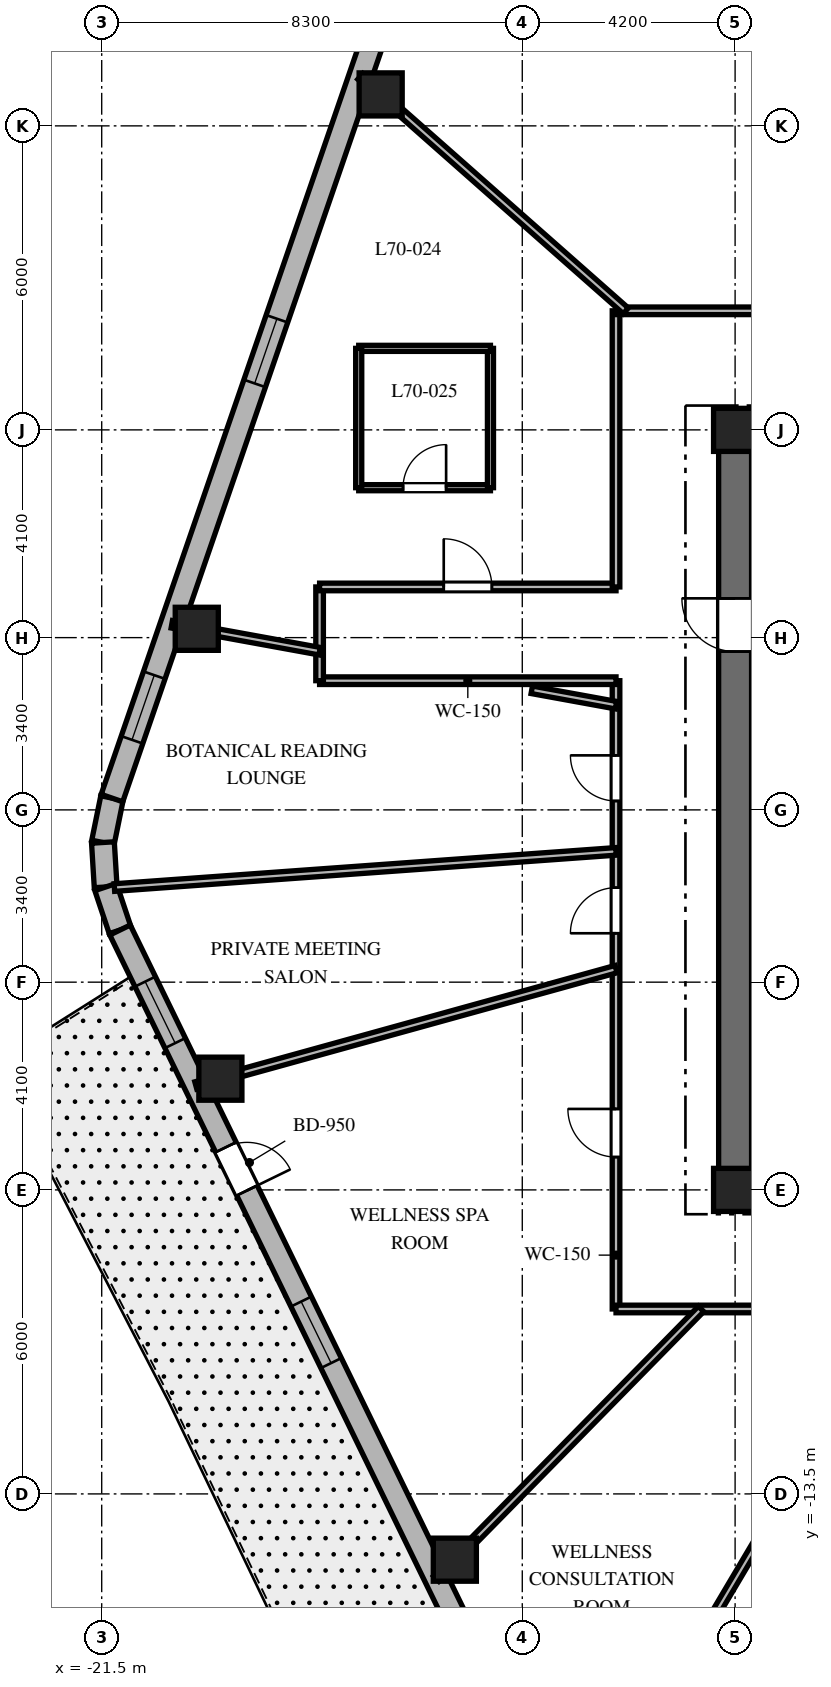
"""IFC4 building model, lengths in metres.
Left out: names, types, materials, properties, quantities, classifications, styles, units other than length and angle.
Written with IfcOpenShell. Run it as: python <this file> out.ifc"""

import sys

from ifc_helpers import new_model, si_unit, direction, frame, frame_2d, origin, origin_2d, place, context, subcontext, project, spatial, rectangle, extrude, element, fill, save


model = new_model("IFC4")
c1 = context("Model", 3, precision=1e-05, world=origin(), true_north=direction((0.0, 1.0)))
c2 = subcontext(c1, "Body", "Model", "MODEL_VIEW")
j1 = project(units=[si_unit("LENGTHUNIT", "METRE"), si_unit("PLANEANGLEUNIT", "RADIAN")], contexts=[c1])
p1 = place(None, origin())
s1 = spatial("IfcSite", under=j1, at=p1, CompositionType="ELEMENT")
p2 = place(p1, origin())
s2 = spatial("IfcBuilding", under=s1, at=p2, CompositionType="ELEMENT")
p3 = place(p2, frame((0.0, 0.0, 280.8)))
s3 = spatial("IfcBuildingStorey", under=s2, at=p3, CompositionType="ELEMENT", Elevation=280.8)
p4 = place(p3, frame((-9.325, -7.5, 0.0), z_axis=(0.0, 0.0, 1.0), x_axis=(1.0, 0.0, 0.0)))
e1 = element("IfcWall", 1, at=p4, inside=s3, PredefinedType="SHEAR", context=c2, shape_type="SweptSolid", body=[
    extrude(rectangle(XDim=18.65, YDim=0.65, at=frame_2d((9.325, 0.0))), origin(), (0.0, 0.0, 1.0), 3.9),
])
p5 = place(p4, frame((9.375, 0.0, 0.0)))
e2 = element("IfcOpeningElement", 2, at=p5, cuts=e1, PredefinedType="OPENING", context=c2, shape_type="SweptSolid", body=[
    extrude(rectangle(XDim=1.0, YDim=2.15, at=frame_2d((0.5, 1.075))), frame((0.0, 0.335, 0.0), z_axis=(0.0, -1.0, 0.0), x_axis=(1.0, 0.0, 0.0)), (0.0, 0.0, 1.0), 0.67),
])
p6 = place(p3, frame((-9.325, 7.5, 0.0), z_axis=(0.0, 0.0, 1.0), x_axis=(1.0, 0.0, 0.0)))
e3 = element("IfcWall", 3, at=p6, inside=s3, PredefinedType="SHEAR", context=c2, shape_type="SweptSolid", body=[
    extrude(rectangle(XDim=9.375, YDim=0.65, at=frame_2d((4.688, 0.0))), origin(), (0.0, 0.0, 1.0), 3.9),
])
p7 = place(p3, frame((-9.0, -7.175, 0.0), z_axis=(0.0, 0.0, 1.0), x_axis=(0.0, 1.0, 0.0)))
e4 = element("IfcWall", 4, at=p7, inside=s3, PredefinedType="SHEAR", context=c2, shape_type="SweptSolid", body=[
    extrude(rectangle(XDim=14.35, YDim=0.65, at=frame_2d((7.175, 0.0))), origin(), (0.0, 0.0, 1.0), 3.9),
])
p8 = place(p7, frame((10.3, 0.0, 0.0)))
e5 = element("IfcOpeningElement", 5, at=p8, cuts=e4, PredefinedType="OPENING", context=c2, shape_type="SweptSolid", body=[
    extrude(rectangle(XDim=1.05, YDim=2.15, at=frame_2d((0.525, 1.075))), frame((0.0, 0.335, 0.0), z_axis=(0.0, -1.0, 0.0), x_axis=(1.0, 0.0, 0.0)), (0.0, 0.0, 1.0), 0.67),
])
for number, where, z_axis, x_axis in (
    (6, (-9.0, -7.5, 0.0), (0.0, 0.0, 1.0), (1.0, 0.0, 0.0)),
    (7, (-9.0, 7.5, 0.0), (0.0, 0.0, 1.0), (1.0, 0.0, 0.0)),
    (8, (-15.995, 14.121, 0.0), (0.0, 0.0, 1.0), (1.0, 0.0, 0.0)),
    (9, (-19.624, 3.574, 0.0), (0.0, 0.0, 1.0), (1.0, 0.0, 0.0)),
    (10, (-19.158, -5.305, 0.0), (0.0, 0.0, 1.0), (1.0, 0.0, 0.0)),
    (11, (-14.531, -14.798, 0.0), (0.0, 0.0, 1.0), (1.0, 0.0, 0.0)),
):
    element("IfcColumn", number, at=place(p3, frame(where, z_axis=z_axis, x_axis=x_axis)), inside=s3, PredefinedType="COLUMN", context=c2, shape_type="SweptSolid", body=[
        extrude(rectangle(XDim=0.85, YDim=0.85, at=origin_2d()), origin(), (0.0, 0.0, 1.0), 3.9),
    ])
p9 = place(p3, frame((-21.298, 0.233, 0.0), z_axis=(0.0, 0.0, 1.0), x_axis=(-0.199158176661, -0.979967356941, 0.0)))
e12 = element("IfcWall", 12, at=p9, inside=s3, PredefinedType="SOLIDWALL", context=c2, shape_type="SweptSolid", body=[
    extrude(rectangle(XDim=0.895, YDim=0.45, at=frame_2d((0.447, 0.0))), origin(), (0.0, 0.0, 1.0), 3.6),
])
p10 = place(p3, frame((-21.476, -0.644, 0.0), z_axis=(0.0, 0.0, 1.0), x_axis=(0.061031097918, -0.998135865044, 0.0)))
e13 = element("IfcWall", 13, at=p10, inside=s3, PredefinedType="SOLIDWALL", context=c2, shape_type="SweptSolid", body=[
    extrude(rectangle(XDim=0.88, YDim=0.45, at=frame_2d((0.44, 0.0))), origin(), (0.0, 0.0, 1.0), 3.6),
])
p11 = place(p3, frame((-21.422, -1.522, 0.0), z_axis=(0.0, 0.0, 1.0), x_axis=(0.316964162323, -0.94843751497, 0.0)))
e14 = element("IfcWall", 14, at=p11, inside=s3, PredefinedType="SOLIDWALL", context=c2, shape_type="SweptSolid", body=[
    extrude(rectangle(XDim=0.895, YDim=0.45, at=frame_2d((0.448, 0.0))), origin(), (0.0, 0.0, 1.0), 3.6),
])
p12 = place(p3, frame((-15.26, 17.776, 0.0), z_axis=(0.0, 0.0, 1.0), x_axis=(-0.325407437101, -0.945573899745, 0.0)))
e15 = element("IfcWall", 15, at=p12, inside=s3, PredefinedType="SOLIDWALL", context=c2, shape_type="SweptSolid", body=[
    extrude(rectangle(XDim=18.552, YDim=0.45, at=frame_2d((9.276, 0.0))), origin(), (0.0, 0.0, 1.0), 3.6),
])
p13 = place(p12, frame((1.161, 0.0, 0.8)))
e16 = element("IfcOpeningElement", 16, at=p13, cuts=e15, PredefinedType="OPENING", context=c2, shape_type="SweptSolid", body=[
    extrude(rectangle(XDim=1.35, YDim=1.75, at=frame_2d((0.675, 0.875))), frame((0.0, 0.235, 0.0), z_axis=(0.0, -1.0, 0.0), x_axis=(1.0, 0.0, 0.0)), (0.0, 0.0, 1.0), 0.47),
])
p14 = place(p12, frame((8.548, 0.0, 0.8)))
e17 = element("IfcOpeningElement", 17, at=p14, cuts=e15, PredefinedType="OPENING", context=c2, shape_type="SweptSolid", body=[
    extrude(rectangle(XDim=1.35, YDim=1.75, at=frame_2d((0.675, 0.875))), frame((0.0, 0.235, 0.0), z_axis=(0.0, -1.0, 0.0), x_axis=(1.0, 0.0, 0.0)), (0.0, 0.0, 1.0), 0.47),
])
p15 = place(p12, frame((15.987, 0.0, 0.8)))
e18 = element("IfcOpeningElement", 18, at=p15, cuts=e15, PredefinedType="OPENING", context=c2, shape_type="SweptSolid", body=[
    extrude(rectangle(XDim=1.35, YDim=1.75, at=frame_2d((0.675, 0.875))), frame((0.0, 0.235, 0.0), z_axis=(0.0, -1.0, 0.0), x_axis=(1.0, 0.0, 0.0)), (0.0, 0.0, 1.0), 0.47),
])
p16 = place(p3, frame((-21.138, -2.371, 0.0), z_axis=(0.0, 0.0, 1.0), x_axis=(0.438128124058, -0.89891253574, 0.0)))
e19 = element("IfcWall", 19, at=p16, inside=s3, PredefinedType="SOLIDWALL", context=c2, shape_type="SweptSolid", body=[
    extrude(rectangle(XDim=17.565, YDim=0.45, at=frame_2d((8.782, 0.0))), origin(), (0.0, 0.0, 1.0), 3.6),
])
p17 = place(p16, frame((4.769, 0.0, 0.0)))
e20 = element("IfcOpeningElement", 20, at=p17, cuts=e19, PredefinedType="OPENING", context=c2, shape_type="SweptSolid", body=[
    extrude(rectangle(XDim=0.95, YDim=2.15, at=frame_2d((0.475, 1.075))), frame((0.0, 0.235, 0.0), z_axis=(0.0, -1.0, 0.0), x_axis=(1.0, 0.0, 0.0)), (0.0, 0.0, 1.0), 0.47),
])
p18 = place(p16, frame((1.133, 0.0, 0.8)))
e21 = element("IfcOpeningElement", 21, at=p18, cuts=e19, PredefinedType="OPENING", context=c2, shape_type="SweptSolid", body=[
    extrude(rectangle(XDim=1.35, YDim=1.75, at=frame_2d((0.675, 0.875))), frame((0.0, 0.235, 0.0), z_axis=(0.0, -1.0, 0.0), x_axis=(1.0, 0.0, 0.0)), (0.0, 0.0, 1.0), 0.47),
])
p19 = place(p16, frame((8.158, 0.0, 0.8)))
e22 = element("IfcOpeningElement", 22, at=p19, cuts=e19, PredefinedType="OPENING", context=c2, shape_type="SweptSolid", body=[
    extrude(rectangle(XDim=1.35, YDim=1.75, at=frame_2d((0.675, 0.875))), frame((0.0, 0.235, 0.0), z_axis=(0.0, -1.0, 0.0), x_axis=(1.0, 0.0, 0.0)), (0.0, 0.0, 1.0), 0.47),
])
p20 = place(p16, frame((15.132, 0.0, 0.8)))
e23 = element("IfcOpeningElement", 23, at=p20, cuts=e19, PredefinedType="OPENING", context=c2, shape_type="SweptSolid", body=[
    extrude(rectangle(XDim=1.35, YDim=1.75, at=frame_2d((0.675, 0.875))), frame((0.0, 0.235, 0.0), z_axis=(0.0, -1.0, 0.0), x_axis=(1.0, 0.0, 0.0)), (0.0, 0.0, 1.0), 0.47),
])
p21 = place(p3, frame((-11.35, -9.85, 0.0), z_axis=(0.0, 0.0, 1.0), x_axis=(0.0, 1.0, 0.0)))
e24 = element("IfcWall", 24, at=p21, inside=s3, PredefinedType="PARTITIONING", context=c2, shape_type="SweptSolid", body=[
    extrude(rectangle(XDim=12.4, YDim=0.15, at=frame_2d((6.2, 0.0))), origin(), (0.0, 0.0, 1.0), 3.09),
])
p22 = place(p21, frame((10.026, 0.0, 0.0)))
e25 = element("IfcOpeningElement", 25, at=p22, cuts=e24, PredefinedType="OPENING", context=c2, shape_type="SweptSolid", body=[
    extrude(rectangle(XDim=0.9, YDim=2.03, at=frame_2d((0.45, 1.015))), frame((0.0, 0.085, 0.0), z_axis=(0.0, -1.0, 0.0), x_axis=(1.0, 0.0, 0.0)), (0.0, 0.0, 1.0), 0.17),
])
p23 = place(p21, frame((7.415, 0.0, 0.0)))
e26 = element("IfcOpeningElement", 26, at=p23, cuts=e24, PredefinedType="OPENING", context=c2, shape_type="SweptSolid", body=[
    extrude(rectangle(XDim=0.9, YDim=2.03, at=frame_2d((0.45, 1.015))), frame((0.0, 0.085, 0.0), z_axis=(0.0, -1.0, 0.0), x_axis=(1.0, 0.0, 0.0)), (0.0, 0.0, 1.0), 0.17),
])
p24 = place(p21, frame((2.998, 0.0, 0.0)))
e27 = element("IfcOpeningElement", 27, at=p24, cuts=e24, PredefinedType="OPENING", context=c2, shape_type="SweptSolid", body=[
    extrude(rectangle(XDim=0.95, YDim=2.03, at=frame_2d((0.475, 1.015))), frame((0.0, 0.085, 0.0), z_axis=(0.0, -1.0, 0.0), x_axis=(1.0, 0.0, 0.0)), (0.0, 0.0, 1.0), 0.17),
])
p25 = place(p3, frame((-11.35, 2.55, 0.0), z_axis=(0.0, 0.0, 1.0), x_axis=(-1.0, 0.0, 0.0)))
e28 = element("IfcWall", 28, at=p25, inside=s3, PredefinedType="PARTITIONING", context=c2, shape_type="SweptSolid", body=[
    extrude(rectangle(XDim=5.85, YDim=0.15, at=frame_2d((2.925, 0.0))), origin(), (0.0, 0.0, 1.0), 3.041),
])
p26 = place(p3, frame((-17.2, 2.55, 0.0), z_axis=(0.0, 0.0, 1.0), x_axis=(0.0, 1.0, 0.0)))
e29 = element("IfcWall", 29, at=p26, inside=s3, PredefinedType="PARTITIONING", context=c2, shape_type="SweptSolid", body=[
    extrude(rectangle(XDim=1.85, YDim=0.15, at=frame_2d((0.925, 0.0))), origin(), (0.0, 0.0, 1.0), 3.09),
])
p27 = place(p3, frame((-17.2, 4.4, 0.0), z_axis=(0.0, 0.0, 1.0), x_axis=(1.0, 0.0, 0.0)))
e30 = element("IfcWall", 30, at=p27, inside=s3, PredefinedType="PARTITIONING", context=c2, shape_type="SweptSolid", body=[
    extrude(rectangle(XDim=5.85, YDim=0.15, at=frame_2d((2.925, 0.0))), origin(), (0.0, 0.0, 1.0), 3.041),
])
p28 = place(p27, frame((2.45, 0.0, 0.0)))
e31 = element("IfcOpeningElement", 31, at=p28, cuts=e30, PredefinedType="OPENING", context=c2, shape_type="SweptSolid", body=[
    extrude(rectangle(XDim=0.95, YDim=2.03, at=frame_2d((0.475, 1.015))), frame((0.0, 0.085, 0.0), z_axis=(0.0, -1.0, 0.0), x_axis=(1.0, 0.0, 0.0)), (0.0, 0.0, 1.0), 0.17),
])
p29 = place(p3, frame((-11.35, 4.4, 0.0), z_axis=(0.0, 0.0, 1.0), x_axis=(0.0, 1.0, 0.0)))
e32 = element("IfcWall", 32, at=p29, inside=s3, PredefinedType="PARTITIONING", context=c2, shape_type="SweptSolid", body=[
    extrude(rectangle(XDim=5.45, YDim=0.15, at=frame_2d((2.725, 0.0))), origin(), (0.0, 0.0, 1.0), 3.09),
])
p30 = place(p3, frame((-11.35, 9.85, 0.0), z_axis=(0.0, 0.0, 1.0), x_axis=(1.0, 0.0, 0.0)))
e33 = element("IfcWall", 33, at=p30, inside=s3, PredefinedType="PARTITIONING", context=c2, shape_type="SweptSolid", body=[
    extrude(rectangle(XDim=10.43, YDim=0.15, at=frame_2d((5.215, 0.0))), origin(), (0.0, 0.0, 1.0), 3.09),
])
p31 = place(p30, frame((8.382, 0.0, 0.0)))
e34 = element("IfcOpeningElement", 34, at=p31, cuts=e33, PredefinedType="OPENING", context=c2, shape_type="SweptSolid", body=[
    extrude(rectangle(XDim=0.95, YDim=2.03, at=frame_2d((0.475, 1.015))), frame((0.0, 0.085, 0.0), z_axis=(0.0, -1.0, 0.0), x_axis=(1.0, 0.0, 0.0)), (0.0, 0.0, 1.0), 0.17),
])
p32 = place(p30, frame((3.416, 0.0, 0.0)))
e35 = element("IfcOpeningElement", 35, at=p32, cuts=e33, PredefinedType="OPENING", context=c2, shape_type="SweptSolid", body=[
    extrude(rectangle(XDim=0.95, YDim=2.03, at=frame_2d((0.475, 1.015))), frame((0.0, 0.085, 0.0), z_axis=(0.0, -1.0, 0.0), x_axis=(1.0, 0.0, 0.0)), (0.0, 0.0, 1.0), 0.17),
])
p33 = place(p3, frame((-0.92, -9.85, 0.0), z_axis=(0.0, 0.0, 1.0), x_axis=(-1.0, 0.0, 0.0)))
e36 = element("IfcWall", 36, at=p33, inside=s3, PredefinedType="PARTITIONING", context=c2, shape_type="SweptSolid", body=[
    extrude(rectangle(XDim=10.43, YDim=0.15, at=frame_2d((5.215, 0.0))), origin(), (0.0, 0.0, 1.0), 3.09),
])
p34 = place(p33, frame((6.431, 0.0, 0.0)))
e37 = element("IfcOpeningElement", 37, at=p34, cuts=e36, PredefinedType="OPENING", context=c2, shape_type="SweptSolid", body=[
    extrude(rectangle(XDim=0.9, YDim=2.03, at=frame_2d((0.45, 1.015))), frame((0.0, 0.085, 0.0), z_axis=(0.0, -1.0, 0.0), x_axis=(1.0, 0.0, 0.0)), (0.0, 0.0, 1.0), 0.17),
])
p35 = place(p33, frame((3.052, 0.0, 0.0)))
e38 = element("IfcOpeningElement", 38, at=p35, cuts=e36, PredefinedType="OPENING", context=c2, shape_type="SweptSolid", body=[
    extrude(rectangle(XDim=0.9, YDim=2.03, at=frame_2d((0.45, 1.015))), frame((0.0, 0.085, 0.0), z_axis=(0.0, -1.0, 0.0), x_axis=(1.0, 0.0, 0.0)), (0.0, 0.0, 1.0), 0.17),
])
p36 = place(p3, frame((-11.157, 9.85, 0.0), z_axis=(0.0, 0.0, 1.0), x_axis=(-0.74966962095, 0.661812253909, 0.0)))
e39 = element("IfcWall", 39, at=p36, inside=s3, PredefinedType="PARTITIONING", context=c2, shape_type="SweptSolid", body=[
    extrude(rectangle(XDim=6.989, YDim=0.15, at=frame_2d((3.494, 0.0))), origin(), (0.0, 0.0, 1.0), 2.94),
])
p37 = place(p3, frame((-11.35, 2.067, 0.0), z_axis=(0.0, 0.0, 1.0), x_axis=(-0.983807459651, 0.179228575665, 0.0)))
e40 = element("IfcWall", 40, at=p37, inside=s3, PredefinedType="PARTITIONING", context=c2, shape_type="SweptSolid", body=[
    extrude(rectangle(XDim=1.69, YDim=0.15, at=frame_2d((0.845, 0.0))), origin(), (0.0, 0.0, 1.0), 3.6),
])
p38 = place(p3, frame((-17.2, 3.133, 0.0), z_axis=(0.0, 0.0, 1.0), x_axis=(-0.983817168797, 0.179175272791, 0.0)))
e41 = element("IfcWall", 41, at=p38, inside=s3, PredefinedType="PARTITIONING", context=c2, shape_type="SweptSolid", body=[
    extrude(rectangle(XDim=2.965, YDim=0.15, at=frame_2d((1.482, 0.0))), origin(), (0.0, 0.0, 1.0), 2.94),
])
p39 = place(p3, frame((-11.35, -0.819, 0.0), z_axis=(0.0, 0.0, 1.0), x_axis=(-0.997408384284, -0.071948001776, 0.0)))
e42 = element("IfcWall", 42, at=p39, inside=s3, PredefinedType="PARTITIONING", context=c2, shape_type="SweptSolid", body=[
    extrude(rectangle(XDim=9.925, YDim=0.15, at=frame_2d((4.963, 0.0))), origin(), (0.0, 0.0, 1.0), 2.94),
])
p40 = place(p3, frame((-11.35, -3.143, 0.0), z_axis=(0.0, 0.0, 1.0), x_axis=(-0.963731818141, -0.266872596386, 0.0)))
e43 = element("IfcWall", 43, at=p40, inside=s3, PredefinedType="PARTITIONING", context=c2, shape_type="SweptSolid", body=[
    extrude(rectangle(XDim=8.605, YDim=0.15, at=frame_2d((4.302, 0.0))), origin(), (0.0, 0.0, 1.0), 2.94),
])
p41 = place(p3, frame((-9.672, -9.85, 0.0), z_axis=(0.0, 0.0, 1.0), x_axis=(-0.700629771301, -0.713524998558, 0.0)))
e44 = element("IfcWall", 44, at=p41, inside=s3, PredefinedType="PARTITIONING", context=c2, shape_type="SweptSolid", body=[
    extrude(rectangle(XDim=7.459, YDim=0.15, at=frame_2d((3.73, 0.0))), origin(), (0.0, 0.0, 1.0), 2.94),
])
p42 = place(p3, frame((-5.833, -9.85, 0.0), z_axis=(0.0, 0.0, 1.0), x_axis=(-0.509561365941, -0.860434317272, 0.0)))
e45 = element("IfcWall", 45, at=p42, inside=s3, PredefinedType="PARTITIONING", context=c2, shape_type="SweptSolid", body=[
    extrude(rectangle(XDim=11.385, YDim=0.15, at=frame_2d((5.692, 0.0))), origin(), (0.0, 0.0, 1.0), 2.94),
])
p43 = place(p3, frame((-16.428, 6.359, 0.0), z_axis=(0.0, 0.0, 1.0), x_axis=(1.0, 0.0, 0.0)))
e46 = element("IfcWall", 46, at=p43, inside=s3, PredefinedType="PARTITIONING", context=c2, shape_type="SweptSolid", body=[
    extrude(rectangle(XDim=2.6, YDim=0.12, at=frame_2d((1.3, 0.0))), origin(), (0.0, 0.0, 1.0), 3.172),
])
p44 = place(p43, frame((0.875, 0.0, 0.0)))
e47 = element("IfcOpeningElement", 47, at=p44, cuts=e46, PredefinedType="OPENING", context=c2, shape_type="SweptSolid", body=[
    extrude(rectangle(XDim=0.85, YDim=2.03, at=frame_2d((0.425, 1.015))), frame((0.0, 0.07, 0.0), z_axis=(0.0, -1.0, 0.0), x_axis=(1.0, 0.0, 0.0)), (0.0, 0.0, 1.0), 0.14),
])
p45 = place(p3, frame((-13.828, 6.359, 0.0), z_axis=(0.0, 0.0, 1.0), x_axis=(0.0, 1.0, 0.0)))
e48 = element("IfcWall", 48, at=p45, inside=s3, PredefinedType="PARTITIONING", context=c2, shape_type="SweptSolid", body=[
    extrude(rectangle(XDim=2.75, YDim=0.12, at=frame_2d((1.375, 0.0))), origin(), (0.0, 0.0, 1.0), 3.6),
])
p46 = place(p3, frame((-13.828, 9.109, 0.0), z_axis=(0.0, 0.0, 1.0), x_axis=(-1.0, 0.0, 0.0)))
e49 = element("IfcWall", 49, at=p46, inside=s3, PredefinedType="PARTITIONING", context=c2, shape_type="SweptSolid", body=[
    extrude(rectangle(XDim=2.6, YDim=0.12, at=frame_2d((1.3, 0.0))), origin(), (0.0, 0.0, 1.0), 3.172),
])
p47 = place(p3, frame((-16.428, 9.109, 0.0), z_axis=(0.0, 0.0, 1.0), x_axis=(0.0, -1.0, 0.0)))
e50 = element("IfcWall", 50, at=p47, inside=s3, PredefinedType="PARTITIONING", context=c2, shape_type="SweptSolid", body=[
    extrude(rectangle(XDim=2.75, YDim=0.12, at=frame_2d((1.375, 0.0))), origin(), (0.0, 0.0, 1.0), 3.6),
])
p48 = place(p14, origin())
e51 = element("IfcWindow", 51, at=p48, inside=s3, PartitioningType="SINGLE_PANEL", PredefinedType="WINDOW", context=c2, shape_type="SweptSolid", body=[
    extrude(rectangle(XDim=1.35, YDim=1.75, at=frame_2d((0.675, 0.875))), frame((0.0, 0.03, 0.0), z_axis=(0.0, -1.0, 0.0), x_axis=(1.0, 0.0, 0.0)), (0.0, 0.0, 1.0), 0.06),
])
fill(e17, e51)
p49 = place(p15, origin())
e52 = element("IfcWindow", 52, at=p49, inside=s3, PartitioningType="SINGLE_PANEL", PredefinedType="WINDOW", context=c2, shape_type="SweptSolid", body=[
    extrude(rectangle(XDim=1.35, YDim=1.75, at=frame_2d((0.675, 0.875))), frame((0.0, 0.03, 0.0), z_axis=(0.0, -1.0, 0.0), x_axis=(1.0, 0.0, 0.0)), (0.0, 0.0, 1.0), 0.06),
])
fill(e18, e52)
p50 = place(p17, origin())
e53 = element("IfcDoor", 53, at=p50, inside=s3, OperationType="SINGLE_SWING_RIGHT", PredefinedType="DOOR", context=c2, shape_type="SweptSolid", body=[
    extrude(rectangle(XDim=0.95, YDim=2.15, at=frame_2d((0.475, 1.075))), frame((0.0, 0.025, 0.0), z_axis=(0.0, -1.0, 0.0), x_axis=(1.0, 0.0, 0.0)), (0.0, 0.0, 1.0), 0.05),
])
fill(e20, e53)
p51 = place(p18, origin())
e54 = element("IfcWindow", 54, at=p51, inside=s3, PartitioningType="SINGLE_PANEL", PredefinedType="WINDOW", context=c2, shape_type="SweptSolid", body=[
    extrude(rectangle(XDim=1.35, YDim=1.75, at=frame_2d((0.675, 0.875))), frame((0.0, 0.03, 0.0), z_axis=(0.0, -1.0, 0.0), x_axis=(1.0, 0.0, 0.0)), (0.0, 0.0, 1.0), 0.06),
])
fill(e21, e54)
p52 = place(p19, origin())
e55 = element("IfcWindow", 55, at=p52, inside=s3, PartitioningType="SINGLE_PANEL", PredefinedType="WINDOW", context=c2, shape_type="SweptSolid", body=[
    extrude(rectangle(XDim=1.35, YDim=1.75, at=frame_2d((0.675, 0.875))), frame((0.0, 0.03, 0.0), z_axis=(0.0, -1.0, 0.0), x_axis=(1.0, 0.0, 0.0)), (0.0, 0.0, 1.0), 0.06),
])
fill(e22, e55)
p53 = place(p8, origin())
e56 = element("IfcDoor", 56, at=p53, inside=s3, OperationType="SINGLE_SWING_RIGHT", PredefinedType="DOOR", context=c2, shape_type="SweptSolid", body=[
    extrude(rectangle(XDim=1.05, YDim=2.15, at=frame_2d((0.525, 1.075))), frame((0.0, 0.025, 0.0), z_axis=(0.0, -1.0, 0.0), x_axis=(1.0, 0.0, 0.0)), (0.0, 0.0, 1.0), 0.05),
])
fill(e5, e56)
p54 = place(p28, origin())
e57 = element("IfcDoor", 57, at=p54, inside=s3, OperationType="SINGLE_SWING_LEFT", PredefinedType="DOOR", context=c2, shape_type="SweptSolid", body=[
    extrude(rectangle(XDim=0.95, YDim=2.03, at=frame_2d((0.475, 1.015))), frame((0.0, 0.025, 0.0), z_axis=(0.0, -1.0, 0.0), x_axis=(1.0, 0.0, 0.0)), (0.0, 0.0, 1.0), 0.05),
])
fill(e31, e57)
p55 = place(p44, origin())
e58 = element("IfcDoor", 58, at=p55, inside=s3, OperationType="SINGLE_SWING_RIGHT", PredefinedType="DOOR", context=c2, shape_type="SweptSolid", body=[
    extrude(rectangle(XDim=0.85, YDim=2.03, at=frame_2d((0.425, 1.015))), frame((0.0, 0.025, 0.0), z_axis=(0.0, -1.0, 0.0), x_axis=(1.0, 0.0, 0.0)), (0.0, 0.0, 1.0), 0.05),
])
fill(e47, e58)
p56 = place(p22, origin())
e59 = element("IfcDoor", 59, at=p56, inside=s3, OperationType="SINGLE_SWING_RIGHT", PredefinedType="DOOR", context=c2, shape_type="SweptSolid", body=[
    extrude(rectangle(XDim=0.9, YDim=2.03, at=frame_2d((0.45, 1.015))), frame((0.0, 0.025, 0.0), z_axis=(0.0, -1.0, 0.0), x_axis=(1.0, 0.0, 0.0)), (0.0, 0.0, 1.0), 0.05),
])
fill(e25, e59)
p57 = place(p23, origin())
e60 = element("IfcDoor", 60, at=p57, inside=s3, OperationType="SINGLE_SWING_LEFT", PredefinedType="DOOR", context=c2, shape_type="SweptSolid", body=[
    extrude(rectangle(XDim=0.9, YDim=2.03, at=frame_2d((0.45, 1.015))), frame((0.0, 0.025, 0.0), z_axis=(0.0, -1.0, 0.0), x_axis=(1.0, 0.0, 0.0)), (0.0, 0.0, 1.0), 0.05),
])
fill(e26, e60)
p58 = place(p24, origin())
e61 = element("IfcDoor", 61, at=p58, inside=s3, OperationType="SINGLE_SWING_RIGHT", PredefinedType="DOOR", context=c2, shape_type="SweptSolid", body=[
    extrude(rectangle(XDim=0.95, YDim=2.03, at=frame_2d((0.475, 1.015))), frame((0.0, 0.025, 0.0), z_axis=(0.0, -1.0, 0.0), x_axis=(1.0, 0.0, 0.0)), (0.0, 0.0, 1.0), 0.05),
])
fill(e27, e61)
save(model, sys.argv[1])
